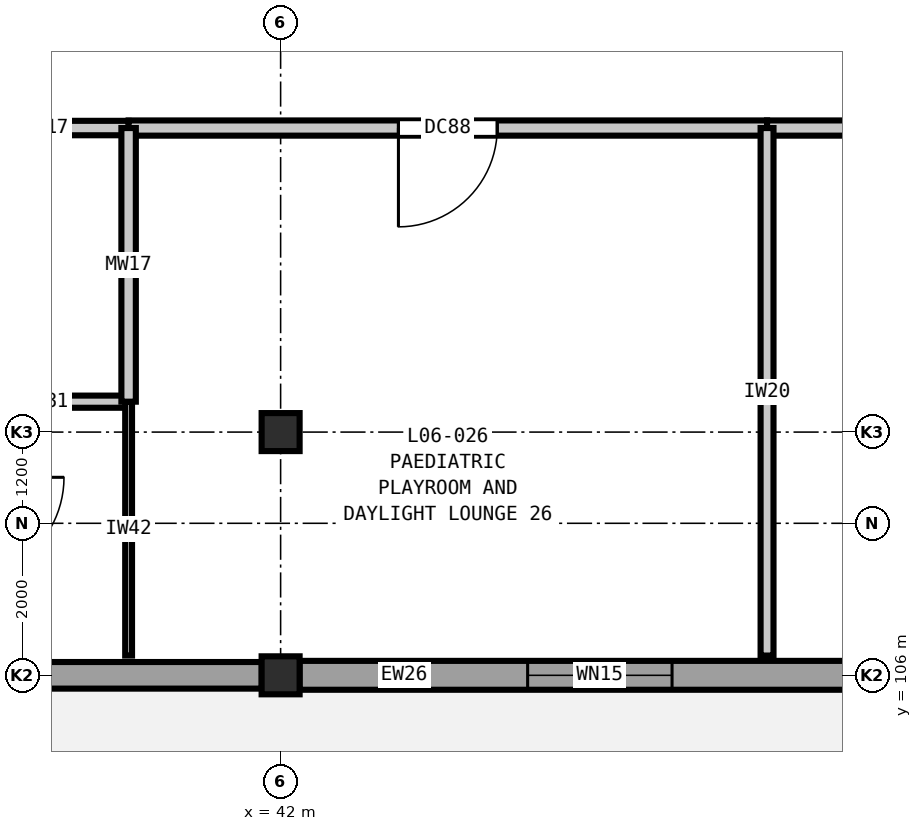
"""IFC4 building model, lengths in metres.
Left out: names, types, materials, properties, quantities, classifications, styles, units other than length and angle.
Written with IfcOpenShell. Run it as: python <this file> out.ifc"""

import sys

from ifc_helpers import new_model, si_unit, direction, frame, frame_2d, origin, origin_2d, place, context, subcontext, project, spatial, rectangle, extrude, element, fill, save


model = new_model("IFC4")
c1 = context("Model", 3, precision=1e-05, world=origin(), true_north=direction((0.0, 1.0)))
c2 = subcontext(c1, "Body", "Model", "MODEL_VIEW")
j1 = project(units=[si_unit("LENGTHUNIT", "METRE"), si_unit("PLANEANGLEUNIT", "RADIAN")], contexts=[c1])
p1 = place(None, origin())
s1 = spatial("IfcSite", under=j1, at=p1, CompositionType="ELEMENT")
p2 = place(p1, origin())
s2 = spatial("IfcBuilding", under=s1, at=p2, CompositionType="ELEMENT")
p3 = place(p2, frame((0.0, 0.0, 28.8)))
s3 = spatial("IfcBuildingStorey", under=s2, at=p3, CompositionType="ELEMENT", Elevation=28.8)
for number, where, z_axis, x_axis in (
    (1, (42.0, 106.0, 0.0), (0.0, 0.0, 1.0), (1.0, 0.0, 0.0)),
    (2, (42.0, 109.2, 0.0), (0.0, 0.0, 1.0), (1.0, 0.0, 0.0)),
):
    element("IfcColumn", number, at=place(p3, frame(where, z_axis=z_axis, x_axis=x_axis)), inside=s3, PredefinedType="COLUMN", context=c2, shape_type="SweptSolid", body=[
        extrude(rectangle(XDim=0.5, YDim=0.5, at=origin_2d()), origin(), (0.0, 0.0, 1.0), 4.2),
    ])
p4 = place(p3, frame((50.152, 106.0, 0.0), z_axis=(0.0, 0.0, 1.0), x_axis=(-1.0, 0.0, 0.0)))
e3 = element("IfcWall", 3, at=p4, inside=s3, PredefinedType="SOLIDWALL", context=c2, shape_type="SweptSolid", body=[
    extrude(rectangle(XDim=7.904, YDim=0.38, at=frame_2d((3.952, 0.0))), origin(), (0.0, 0.0, 1.0), 3.48),
])
p5 = place(p4, frame((3.002, 0.0, 0.9)))
e4 = element("IfcOpeningElement", 4, at=p5, cuts=e3, PredefinedType="OPENING", context=c2, shape_type="SweptSolid", body=[
    extrude(rectangle(XDim=1.9, YDim=2.15, at=frame_2d((0.95, 1.075))), frame((0.0, 0.2, 0.0), z_axis=(0.0, -1.0, 0.0), x_axis=(1.0, 0.0, 0.0)), (0.0, 0.0, 1.0), 0.4),
])
p6 = place(p3, frame((41.752, 106.0, 0.0), z_axis=(0.0, 0.0, 1.0), x_axis=(-1.0, 0.0, 0.0)))
e5 = element("IfcWall", 5, at=p6, inside=s3, PredefinedType="SOLIDWALL", context=c2, shape_type="SweptSolid", body=[
    extrude(rectangle(XDim=7.904, YDim=0.35, at=frame_2d((3.952, 0.0))), origin(), (0.0, 0.0, 1.0), 3.48),
])
p7 = place(p3, frame((37.8, 109.6, 0.0), z_axis=(0.0, 0.0, 1.0), x_axis=(1.0, 0.0, 0.0)))
e6 = element("IfcWall", 6, at=p7, inside=s3, PredefinedType="PLUMBINGWALL", context=c2, shape_type="SweptSolid", body=[
    extrude(rectangle(XDim=2.2, YDim=0.16, at=frame_2d((1.1, 0.0))), origin(), (0.0, 0.0, 1.0), 3.92),
])
p8 = place(p3, frame((37.8, 113.2, 0.0), z_axis=(0.0, 0.0, 1.0), x_axis=(1.0, 0.0, 0.0)))
e7 = element("IfcWall", 7, at=p8, inside=s3, PredefinedType="PLUMBINGWALL", context=c2, shape_type="SweptSolid", body=[
    extrude(rectangle(XDim=2.2, YDim=0.19, at=frame_2d((1.1, 0.0))), origin(), (0.0, 0.0, 1.0), 3.92),
])
p9 = place(p3, frame((40.0, 113.2, 0.0), z_axis=(0.0, 0.0, 1.0), x_axis=(1.0, 0.0, 0.0)))
e8 = element("IfcWall", 8, at=p9, inside=s3, PredefinedType="PARTITIONING", context=c2, shape_type="SweptSolid", body=[
    extrude(rectangle(XDim=8.4, YDim=0.2, at=frame_2d((4.2, 0.0))), origin(), (0.0, 0.0, 1.0), 3.92),
])
p10 = place(p9, frame((3.55, 0.0, 0.0)))
e9 = element("IfcOpeningElement", 9, at=p10, cuts=e8, PredefinedType="OPENING", context=c2, shape_type="SweptSolid", body=[
    extrude(rectangle(XDim=1.3, YDim=2.2, at=frame_2d((0.65, 1.1))), frame((0.0, 0.11, 0.0), z_axis=(0.0, -1.0, 0.0), x_axis=(1.0, 0.0, 0.0)), (0.0, 0.0, 1.0), 0.22),
])
p11 = place(p3, frame((48.4, 113.2, 0.0), z_axis=(0.0, 0.0, 1.0), x_axis=(1.0, 0.0, 0.0)))
e10 = element("IfcWall", 10, at=p11, inside=s3, PredefinedType="PARTITIONING", context=c2, shape_type="SweptSolid", body=[
    extrude(rectangle(XDim=9.2, YDim=0.2, at=frame_2d((4.6, 0.0))), origin(), (0.0, 0.0, 1.0), 3.92),
])
p12 = place(p11, frame((3.925, 0.0, 0.0)))
e11 = element("IfcOpeningElement", 11, at=p12, cuts=e10, PredefinedType="OPENING", context=c2, shape_type="SweptSolid", body=[
    extrude(rectangle(XDim=1.35, YDim=2.2, at=frame_2d((0.675, 1.1))), frame((0.0, 0.11, 0.0), z_axis=(0.0, -1.0, 0.0), x_axis=(1.0, 0.0, 0.0)), (0.0, 0.0, 1.0), 0.22),
])
p13 = place(p3, frame((40.0, 106.26, 0.0), z_axis=(0.0, 0.0, 1.0), x_axis=(0.0, 1.0, 0.0)))
e12 = element("IfcWall", 12, at=p13, inside=s3, PredefinedType="PARTITIONING", context=c2, shape_type="SweptSolid", body=[
    extrude(rectangle(XDim=3.34, YDim=0.09, at=frame_2d((1.67, 0.0))), origin(), (0.0, 0.0, 1.0), 3.92),
])
p14 = place(p3, frame((40.0, 109.6, 0.0), z_axis=(0.0, 0.0, 1.0), x_axis=(0.0, 1.0, 0.0)))
e13 = element("IfcWall", 13, at=p14, inside=s3, PredefinedType="PLUMBINGWALL", context=c2, shape_type="SweptSolid", body=[
    extrude(rectangle(XDim=3.6, YDim=0.19, at=frame_2d((1.8, 0.0))), origin(), (0.0, 0.0, 1.0), 3.92),
])
p15 = place(p3, frame((48.4, 106.26, 0.0), z_axis=(0.0, 0.0, 1.0), x_axis=(0.0, 1.0, 0.0)))
e14 = element("IfcWall", 14, at=p15, inside=s3, PredefinedType="PARTITIONING", context=c2, shape_type="SweptSolid", body=[
    extrude(rectangle(XDim=6.94, YDim=0.17, at=frame_2d((3.47, 0.0))), origin(), (0.0, 0.0, 1.0), 3.92),
])
p16 = place(p5, origin())
e15 = element("IfcWindow", 15, at=p16, inside=s3, PartitioningType="DOUBLE_PANEL_VERTICAL", PredefinedType="WINDOW", context=c2, shape_type="SweptSolid", body=[
    extrude(rectangle(XDim=1.9, YDim=2.15, at=frame_2d((0.95, 1.075))), frame((0.0, 0.03, 0.0), z_axis=(0.0, -1.0, 0.0), x_axis=(1.0, 0.0, 0.0)), (0.0, 0.0, 1.0), 0.06),
])
fill(e4, e15)
p17 = place(p10, frame((1.3, 0.0, 0.0), z_axis=(0.0, 0.0, 1.0), x_axis=(-1.0, 0.0, 0.0)))
e16 = element("IfcDoor", 16, at=p17, inside=s3, OperationType="SINGLE_SWING_RIGHT", PredefinedType="DOOR", context=c2, shape_type="SweptSolid", body=[
    extrude(rectangle(XDim=1.3, YDim=2.2, at=frame_2d((0.65, 1.1))), frame((0.0, 0.025, 0.0), z_axis=(0.0, -1.0, 0.0), x_axis=(1.0, 0.0, 0.0)), (0.0, 0.0, 1.0), 0.05),
])
fill(e9, e16)
save(model, sys.argv[1])
